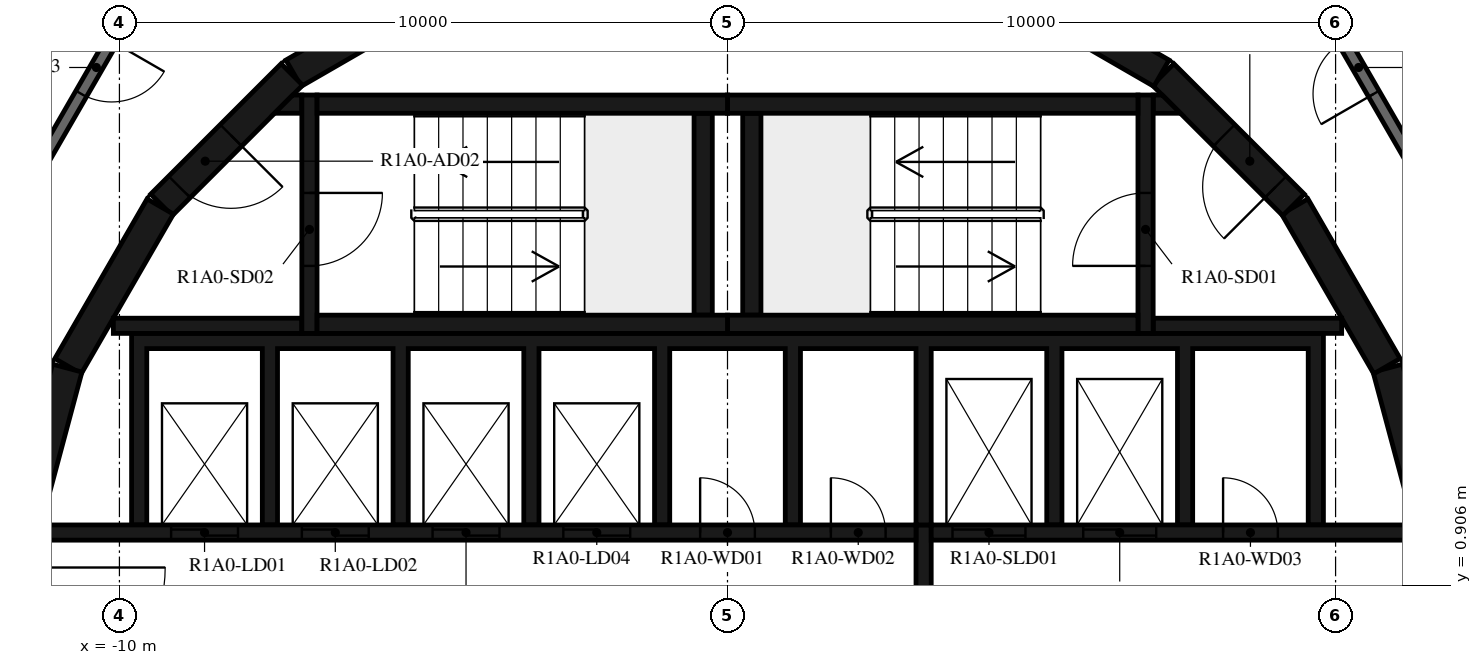
"""IFC4 building model, lengths in metres.
Left out: names, types, materials, properties, quantities, classifications, styles, units other than length and angle.
Written with IfcOpenShell. Run it as: python <this file> out.ifc"""

import sys

from ifc_helpers import new_model, si_unit, direction, frame, frame_2d, origin, place, context, subcontext, project, spatial, polyline, rectangle, outline, extrude, element, fill, save


model = new_model("IFC4")
c1 = context("Model", 3, precision=1e-05, world=origin(), true_north=direction((0.0, 1.0)))
c2 = subcontext(c1, "Body", "Model", "MODEL_VIEW")
j1 = project(units=[si_unit("LENGTHUNIT", "METRE"), si_unit("PLANEANGLEUNIT", "RADIAN")], contexts=[c1])
p1 = place(None, origin())
s1 = spatial("IfcSite", under=j1, at=p1, CompositionType="ELEMENT")
p2 = place(p1, origin())
s2 = spatial("IfcBuilding", under=s1, at=p2, CompositionType="ELEMENT")
p3 = place(p2, frame((0.0, 0.0, 38.4)))
s3 = spatial("IfcBuildingStorey", under=s2, at=p3, CompositionType="ELEMENT", Elevation=38.4)
for number, where, z_axis, x_axis in (
    (1, (11.643, 1.55, 0.0), (0.0, 0.0, 1.0), (-0.259, 0.966, 0.0)),
    (2, (10.845, 4.51, 0.0), (0.0, 0.0, 1.0), (-0.5, 0.866, 0.0)),
):
    element("IfcWall", number, at=place(p3, frame(where, z_axis=z_axis, x_axis=x_axis)), inside=s3, PredefinedType="SHEAR", context=c2, shape_type="SweptSolid", body=[
        extrude(rectangle(XDim=3.033, YDim=0.5, at=frame_2d((1.516, 0.0))), origin(), (0.0, 0.0, 1.0), 3.12),
    ])
p4 = place(p3, frame((9.308, 7.164, 0.0), z_axis=(0.0, 0.0, 1.0), x_axis=(-0.707106781187, 0.707106781187, 0.0)))
e3 = element("IfcWall", 3, at=p4, inside=s3, PredefinedType="SHEAR", context=c2, shape_type="SweptSolid", body=[
    extrude(rectangle(XDim=3.032, YDim=0.5, at=frame_2d((1.516, 0.0))), origin(), (0.0, 0.0, 1.0), 3.12),
])
p5 = place(p4, frame((0.416, 0.0, 0.0)))
e4 = element("IfcOpeningElement", 4, at=p5, cuts=e3, PredefinedType="OPENING", context=c2, shape_type="SweptSolid", body=[
    extrude(rectangle(XDim=1.2, YDim=2.1, at=frame_2d((0.6, 1.05))), frame((0.0, 0.26, 0.0), z_axis=(0.0, -1.0, 0.0), x_axis=(1.0, 0.0, 0.0)), (0.0, 0.0, 1.0), 0.52),
])
for number, where, z_axis, x_axis in (
    (5, (7.137, 9.329, 0.0), (0.0, 0.0, 1.0), (-0.866, 0.5, 0.0)),
    (6, (-4.51, 10.845, 0.0), (0.0, 0.0, 1.0), (-0.866, -0.5, 0.0)),
):
    element("IfcWall", number, at=place(p3, frame(where, z_axis=z_axis, x_axis=x_axis)), inside=s3, PredefinedType="SHEAR", context=c2, shape_type="SweptSolid", body=[
        extrude(rectangle(XDim=3.033, YDim=0.5, at=frame_2d((1.516, 0.0))), origin(), (0.0, 0.0, 1.0), 3.12),
    ])
p6 = place(p3, frame((-7.164, 9.308, 0.0), z_axis=(0.0, 0.0, 1.0), x_axis=(-0.707106781187, -0.707106781187, 0.0)))
e7 = element("IfcWall", 7, at=p6, inside=s3, PredefinedType="SHEAR", context=c2, shape_type="SweptSolid", body=[
    extrude(rectangle(XDim=3.032, YDim=0.5, at=frame_2d((1.516, 0.0))), origin(), (0.0, 0.0, 1.0), 3.12),
])
p7 = place(p6, frame((1.416, 0.0, 0.0)))
e8 = element("IfcOpeningElement", 8, at=p7, cuts=e7, PredefinedType="OPENING", context=c2, shape_type="SweptSolid", body=[
    extrude(rectangle(XDim=1.2, YDim=2.1, at=frame_2d((0.6, 1.05))), frame((0.0, 0.26, 0.0), z_axis=(0.0, -1.0, 0.0), x_axis=(1.0, 0.0, 0.0)), (0.0, 0.0, 1.0), 0.52),
])
for number, where, z_axis, x_axis in (
    (9, (-9.329, 7.137, 0.0), (0.0, 0.0, 1.0), (-0.5, -0.866, 0.0)),
    (10, (-10.858, 4.479, 0.0), (0.0, 0.0, 1.0), (-0.259, -0.966, 0.0)),
):
    element("IfcWall", number, at=place(p3, frame(where, z_axis=z_axis, x_axis=x_axis)), inside=s3, PredefinedType="SHEAR", context=c2, shape_type="SweptSolid", body=[
        extrude(rectangle(XDim=3.033, YDim=0.5, at=frame_2d((1.516, 0.0))), origin(), (0.0, 0.0, 1.0), 3.12),
    ])
for number, where, z_axis, x_axis in (
    (11, (0.0, 5.2, 0.0), (0.0, 0.0, 1.0), (1.0, 0.0, 0.0)),
    (12, (0.0, 8.82, 0.0), (0.0, 0.0, 1.0), (1.0, 0.0, 0.0)),
):
    element("IfcWall", number, at=place(p3, frame(where, z_axis=z_axis, x_axis=x_axis)), inside=s3, PredefinedType="SHEAR", context=c2, shape_type="SweptSolid", body=[
        extrude(rectangle(XDim=6.75, YDim=0.3, at=frame_2d((3.375, 0.0))), origin(), (0.0, 0.0, 1.0), 3.12),
    ])
p8 = place(p3, frame((0.4, 5.35, 0.0), z_axis=(0.0, 0.0, 1.0), x_axis=(0.0, 1.0, 0.0)))
e13 = element("IfcWall", 13, at=p8, inside=s3, PredefinedType="SHEAR", context=c2, shape_type="SweptSolid", body=[
    extrude(rectangle(XDim=3.32, YDim=0.3, at=frame_2d((1.66, 0.0))), origin(), (0.0, 0.0, 1.0), 3.12),
])
p9 = place(p3, frame((6.875, 5.05, 0.0), z_axis=(0.0, 0.0, 1.0), x_axis=(0.0, 1.0, 0.0)))
e14 = element("IfcWall", 14, at=p9, inside=s3, PredefinedType="SHEAR", context=c2, shape_type="SweptSolid", body=[
    extrude(rectangle(XDim=3.92, YDim=0.25, at=frame_2d((1.96, 0.0))), origin(), (0.0, 0.0, 1.0), 3.12),
])
p10 = place(p9, frame((1.11, 0.0, 0.0)))
e15 = element("IfcOpeningElement", 15, at=p10, cuts=e14, PredefinedType="OPENING", context=c2, shape_type="SweptSolid", body=[
    extrude(rectangle(XDim=1.2, YDim=2.1, at=frame_2d((0.6, 1.05))), frame((0.0, 0.135, 0.0), z_axis=(0.0, -1.0, 0.0), x_axis=(1.0, 0.0, 0.0)), (0.0, 0.0, 1.0), 0.27),
])
p11 = place(p3, frame((7.0, 5.175, 0.0), z_axis=(0.0, 0.0, 1.0), x_axis=(1.0, 0.0, 0.0)))
e16 = element("IfcWall", 16, at=p11, inside=s3, PredefinedType="SHEAR", context=c2, shape_type="SweptSolid", body=[
    extrude(rectangle(XDim=3.1, YDim=0.25, at=frame_2d((1.55, 0.0))), origin(), (0.0, 0.0, 1.0), 3.12),
])
p12 = place(p3, origin())
e17 = element("IfcWall", 17, at=p12, inside=s3, PredefinedType="SHEAR", context=c2, shape_type="SweptSolid", body=[
    extrude(outline(polyline([(7.448, 8.67), (7.0, 8.67), (7.0, 8.97), (7.148, 8.97), (7.448, 8.67)])), origin(), (0.0, 0.0, 1.0), 3.12),
])
for number, where, z_axis, x_axis in (
    (18, (-6.75, 5.2, 0.0), (0.0, 0.0, 1.0), (1.0, 0.0, 0.0)),
    (19, (-6.75, 8.82, 0.0), (0.0, 0.0, 1.0), (1.0, 0.0, 0.0)),
):
    element("IfcWall", number, at=place(p3, frame(where, z_axis=z_axis, x_axis=x_axis)), inside=s3, PredefinedType="SHEAR", context=c2, shape_type="SweptSolid", body=[
        extrude(rectangle(XDim=6.75, YDim=0.3, at=frame_2d((3.375, 0.0))), origin(), (0.0, 0.0, 1.0), 3.12),
    ])
p13 = place(p3, frame((-0.4, 5.35, 0.0), z_axis=(0.0, 0.0, 1.0), x_axis=(0.0, 1.0, 0.0)))
e20 = element("IfcWall", 20, at=p13, inside=s3, PredefinedType="SHEAR", context=c2, shape_type="SweptSolid", body=[
    extrude(rectangle(XDim=3.32, YDim=0.3, at=frame_2d((1.66, 0.0))), origin(), (0.0, 0.0, 1.0), 3.12),
])
p14 = place(p3, frame((-6.875, 8.97, 0.0), z_axis=(0.0, 0.0, 1.0), x_axis=(0.0, -1.0, 0.0)))
e21 = element("IfcWall", 21, at=p14, inside=s3, PredefinedType="SHEAR", context=c2, shape_type="SweptSolid", body=[
    extrude(rectangle(XDim=3.92, YDim=0.25, at=frame_2d((1.96, 0.0))), origin(), (0.0, 0.0, 1.0), 3.12),
])
p15 = place(p14, frame((1.61, 0.0, 0.0)))
e22 = element("IfcOpeningElement", 22, at=p15, cuts=e21, PredefinedType="OPENING", context=c2, shape_type="SweptSolid", body=[
    extrude(rectangle(XDim=1.2, YDim=2.1, at=frame_2d((0.6, 1.05))), frame((0.0, 0.135, 0.0), z_axis=(0.0, -1.0, 0.0), x_axis=(1.0, 0.0, 0.0)), (0.0, 0.0, 1.0), 0.27),
])
p16 = place(p3, frame((-7.0, 5.175, 0.0), z_axis=(0.0, 0.0, 1.0), x_axis=(-1.0, 0.0, 0.0)))
e23 = element("IfcWall", 23, at=p16, inside=s3, PredefinedType="SHEAR", context=c2, shape_type="SweptSolid", body=[
    extrude(rectangle(XDim=3.1, YDim=0.25, at=frame_2d((1.55, 0.0))), origin(), (0.0, 0.0, 1.0), 3.12),
])
p17 = place(p3, origin())
e24 = element("IfcWall", 24, at=p17, inside=s3, PredefinedType="SHEAR", context=c2, shape_type="SweptSolid", body=[
    extrude(outline(polyline([(-7.148, 8.97), (-7.0, 8.97), (-7.0, 8.67), (-7.448, 8.67), (-7.148, 8.97)])), origin(), (0.0, 0.0, 1.0), 3.12),
])
p18 = place(p3, origin())
e25 = element("IfcWall", 25, at=p18, inside=s3, PredefinedType="SHEAR", context=c2, shape_type="SweptSolid", body=[
    extrude(outline(polyline([(-9.55, 4.8), (-7.65, 4.8), (-7.65, 1.9), (-7.4, 1.9), (-7.4, 4.8), (-5.5, 4.8), (-5.5, 1.9), (-5.25, 1.9), (-5.25, 4.8), (-3.35, 4.8), (-3.35, 1.9), (-3.1, 1.9), (-3.1, 4.8), (-1.2, 4.8), (-1.2, 1.9), (-0.95, 1.9), (-0.95, 4.8), (0.95, 4.8), (0.95, 1.9), (1.2, 1.9), (1.2, 4.8), (3.1, 4.8), (3.1, 1.9), (3.35, 1.9), (3.35, 4.8), (5.25, 4.8), (5.25, 1.9), (5.5, 1.9), (5.5, 4.8), (7.4, 4.8), (7.4, 1.9), (7.65, 1.9), (7.65, 4.8), (9.55, 4.8), (9.55, 1.9), (9.8, 1.9), (9.8, 4.8), (9.8, 5.05), (-9.8, 5.05), (-9.8, 4.8), (-9.8, 1.9), (-9.55, 1.9), (-9.55, 4.8)])), origin(), (0.0, 0.0, 1.0), 3.12),
])
p19 = place(p3, frame((-11.28, 1.775, 0.0), z_axis=(0.0, 0.0, 1.0), x_axis=(1.0, 0.0, 0.0)))
e26 = element("IfcWall", 26, at=p19, inside=s3, PredefinedType="SHEAR", context=c2, shape_type="SweptSolid", body=[
    extrude(rectangle(XDim=14.38, YDim=0.25, at=frame_2d((7.19, 0.0))), origin(), (0.0, 0.0, 1.0), 3.12),
])
p20 = place(p19, frame((2.13, 0.0, 0.0)))
e27 = element("IfcOpeningElement", 27, at=p20, cuts=e26, PredefinedType="OPENING", context=c2, shape_type="SweptSolid", body=[
    extrude(rectangle(XDim=1.1, YDim=2.1, at=frame_2d((0.55, 1.05))), frame((0.0, 0.135, 0.0), z_axis=(0.0, -1.0, 0.0), x_axis=(1.0, 0.0, 0.0)), (0.0, 0.0, 1.0), 0.27),
])
p21 = place(p19, frame((4.28, 0.0, 0.0)))
e28 = element("IfcOpeningElement", 28, at=p21, cuts=e26, PredefinedType="OPENING", context=c2, shape_type="SweptSolid", body=[
    extrude(rectangle(XDim=1.1, YDim=2.1, at=frame_2d((0.55, 1.05))), frame((0.0, 0.135, 0.0), z_axis=(0.0, -1.0, 0.0), x_axis=(1.0, 0.0, 0.0)), (0.0, 0.0, 1.0), 0.27),
])
p22 = place(p19, frame((6.43, 0.0, 0.0)))
e29 = element("IfcOpeningElement", 29, at=p22, cuts=e26, PredefinedType="OPENING", context=c2, shape_type="SweptSolid", body=[
    extrude(rectangle(XDim=1.1, YDim=2.1, at=frame_2d((0.55, 1.05))), frame((0.0, 0.135, 0.0), z_axis=(0.0, -1.0, 0.0), x_axis=(1.0, 0.0, 0.0)), (0.0, 0.0, 1.0), 0.27),
])
p23 = place(p19, frame((8.58, 0.0, 0.0)))
e30 = element("IfcOpeningElement", 30, at=p23, cuts=e26, PredefinedType="OPENING", context=c2, shape_type="SweptSolid", body=[
    extrude(rectangle(XDim=1.1, YDim=2.1, at=frame_2d((0.55, 1.05))), frame((0.0, 0.135, 0.0), z_axis=(0.0, -1.0, 0.0), x_axis=(1.0, 0.0, 0.0)), (0.0, 0.0, 1.0), 0.27),
])
p24 = place(p19, frame((10.83, 0.0, 0.0)))
e31 = element("IfcOpeningElement", 31, at=p24, cuts=e26, PredefinedType="OPENING", context=c2, shape_type="SweptSolid", body=[
    extrude(rectangle(XDim=0.9, YDim=2.1, at=frame_2d((0.45, 1.05))), frame((0.0, 0.135, 0.0), z_axis=(0.0, -1.0, 0.0), x_axis=(1.0, 0.0, 0.0)), (0.0, 0.0, 1.0), 0.27),
])
p25 = place(p19, frame((12.98, 0.0, 0.0)))
e32 = element("IfcOpeningElement", 32, at=p25, cuts=e26, PredefinedType="OPENING", context=c2, shape_type="SweptSolid", body=[
    extrude(rectangle(XDim=0.9, YDim=2.1, at=frame_2d((0.45, 1.05))), frame((0.0, 0.135, 0.0), z_axis=(0.0, -1.0, 0.0), x_axis=(1.0, 0.0, 0.0)), (0.0, 0.0, 1.0), 0.27),
])
p26 = place(p3, frame((3.35, 1.775, 0.0), z_axis=(0.0, 0.0, 1.0), x_axis=(1.0, 0.0, 0.0)))
e33 = element("IfcWall", 33, at=p26, inside=s3, PredefinedType="SHEAR", context=c2, shape_type="SweptSolid", body=[
    extrude(rectangle(XDim=7.93, YDim=0.25, at=frame_2d((3.965, 0.0))), origin(), (0.0, 0.0, 1.0), 3.12),
])
p27 = place(p26, frame((0.35, 0.0, 0.0)))
e34 = element("IfcOpeningElement", 34, at=p27, cuts=e33, PredefinedType="OPENING", context=c2, shape_type="SweptSolid", body=[
    extrude(rectangle(XDim=1.2, YDim=2.4, at=frame_2d((0.6, 1.2))), frame((0.0, 0.135, 0.0), z_axis=(0.0, -1.0, 0.0), x_axis=(1.0, 0.0, 0.0)), (0.0, 0.0, 1.0), 0.27),
])
p28 = place(p26, frame((2.5, 0.0, 0.0)))
e35 = element("IfcOpeningElement", 35, at=p28, cuts=e33, PredefinedType="OPENING", context=c2, shape_type="SweptSolid", body=[
    extrude(rectangle(XDim=1.2, YDim=2.4, at=frame_2d((0.6, 1.2))), frame((0.0, 0.135, 0.0), z_axis=(0.0, -1.0, 0.0), x_axis=(1.0, 0.0, 0.0)), (0.0, 0.0, 1.0), 0.27),
])
p29 = place(p26, frame((4.8, 0.0, 0.0)))
e36 = element("IfcOpeningElement", 36, at=p29, cuts=e33, PredefinedType="OPENING", context=c2, shape_type="SweptSolid", body=[
    extrude(rectangle(XDim=0.9, YDim=2.1, at=frame_2d((0.45, 1.05))), frame((0.0, 0.135, 0.0), z_axis=(0.0, -1.0, 0.0), x_axis=(1.0, 0.0, 0.0)), (0.0, 0.0, 1.0), 0.27),
])
p30 = place(p3, frame((3.225, -1.9, 0.0), z_axis=(0.0, 0.0, 1.0), x_axis=(0.0, 1.0, 0.0)))
e37 = element("IfcWall", 37, at=p30, inside=s3, PredefinedType="SHEAR", context=c2, shape_type="SweptSolid", body=[
    extrude(rectangle(XDim=3.8, YDim=0.25, at=frame_2d((1.9, 0.0))), origin(), (0.0, 0.0, 1.0), 3.12),
])
p31 = place(p3, frame((13.7, 3.671, 0.0), z_axis=(0.0, 0.0, 1.0), x_axis=(-0.500001669485, 0.866024439905, 0.0)))
e38 = element("IfcWall", 38, at=p31, inside=s3, PredefinedType="STANDARD", context=c2, shape_type="SweptSolid", body=[
    extrude(rectangle(XDim=7.342, YDim=0.2, at=frame_2d((3.671, 0.0))), origin(), (0.0, 0.0, 1.0), 3.12),
])
p32 = place(p31, frame((6.142, 0.0, 0.0)))
e39 = element("IfcOpeningElement", 39, at=p32, cuts=e38, PredefinedType="OPENING", context=c2, shape_type="SweptSolid", body=[
    extrude(rectangle(XDim=1.0, YDim=2.1, at=frame_2d((0.5, 1.05))), frame((0.0, 0.11, 0.0), z_axis=(0.0, -1.0, 0.0), x_axis=(1.0, 0.0, 0.0)), (0.0, 0.0, 1.0), 0.22),
])
p33 = place(p3, frame((-10.029, 10.029, 0.0), z_axis=(0.0, 0.0, 1.0), x_axis=(-0.500001669485, -0.866024439905, 0.0)))
e40 = element("IfcWall", 40, at=p33, inside=s3, PredefinedType="STANDARD", context=c2, shape_type="SweptSolid", body=[
    extrude(rectangle(XDim=7.342, YDim=0.2, at=frame_2d((3.671, 0.0))), origin(), (0.0, 0.0, 1.0), 3.12),
])
p34 = place(p33, frame((0.2, 0.0, 0.0)))
e41 = element("IfcOpeningElement", 41, at=p34, cuts=e40, PredefinedType="OPENING", context=c2, shape_type="SweptSolid", body=[
    extrude(rectangle(XDim=1.0, YDim=2.1, at=frame_2d((0.5, 1.05))), frame((0.0, 0.11, 0.0), z_axis=(0.0, -1.0, 0.0), x_axis=(1.0, 0.0, 0.0)), (0.0, 0.0, 1.0), 0.22),
])
p35 = place(p3, frame((12.781, 8.262, 0.0), z_axis=(0.0, 0.0, 1.0), x_axis=(-0.492233259633, 0.870463335305, 0.0)))
e42 = element("IfcWall", 42, at=p35, inside=s3, PredefinedType="PARTITIONING", context=c2, shape_type="SweptSolid", body=[
    extrude(rectangle(XDim=3.336, YDim=0.12, at=frame_2d((1.668, 0.0))), origin(), (0.0, 0.0, 1.0), 3.12),
])
p36 = place(p10, origin())
e43 = element("IfcDoor", 43, at=p36, inside=s3, OperationType="SINGLE_SWING_LEFT", PredefinedType="DOOR", context=c2, shape_type="SweptSolid", body=[
    extrude(rectangle(XDim=1.2, YDim=2.1, at=frame_2d((0.6, 1.05))), frame((0.0, 0.025, 0.0), z_axis=(0.0, -1.0, 0.0), x_axis=(1.0, 0.0, 0.0)), (0.0, 0.0, 1.0), 0.05),
])
fill(e15, e43)
p37 = place(p5, origin())
e44 = element("IfcDoor", 44, at=p37, inside=s3, OperationType="SINGLE_SWING_RIGHT", PredefinedType="DOOR", context=c2, shape_type="SweptSolid", body=[
    extrude(rectangle(XDim=1.2, YDim=2.1, at=frame_2d((0.6, 1.05))), frame((0.0, 0.025, 0.0), z_axis=(0.0, -1.0, 0.0), x_axis=(1.0, 0.0, 0.0)), (0.0, 0.0, 1.0), 0.05),
])
fill(e4, e44)
p38 = place(p15, origin())
e45 = element("IfcDoor", 45, at=p38, inside=s3, OperationType="SINGLE_SWING_LEFT", PredefinedType="DOOR", context=c2, shape_type="SweptSolid", body=[
    extrude(rectangle(XDim=1.2, YDim=2.1, at=frame_2d((0.6, 1.05))), frame((0.0, 0.025, 0.0), z_axis=(0.0, -1.0, 0.0), x_axis=(1.0, 0.0, 0.0)), (0.0, 0.0, 1.0), 0.05),
])
fill(e22, e45)
p39 = place(p7, origin())
e46 = element("IfcDoor", 46, at=p39, inside=s3, OperationType="SINGLE_SWING_RIGHT", PredefinedType="DOOR", context=c2, shape_type="SweptSolid", body=[
    extrude(rectangle(XDim=1.2, YDim=2.1, at=frame_2d((0.6, 1.05))), frame((0.0, 0.025, 0.0), z_axis=(0.0, -1.0, 0.0), x_axis=(1.0, 0.0, 0.0)), (0.0, 0.0, 1.0), 0.05),
])
fill(e8, e46)
p40 = place(p20, origin())
e47 = element("IfcDoor", 47, at=p40, inside=s3, OperationType="DOUBLE_DOOR_SLIDING", PredefinedType="DOOR", context=c2, shape_type="SweptSolid", body=[
    extrude(rectangle(XDim=1.1, YDim=2.1, at=frame_2d((0.55, 1.05))), frame((0.0, 0.025, 0.0), z_axis=(0.0, -1.0, 0.0), x_axis=(1.0, 0.0, 0.0)), (0.0, 0.0, 1.0), 0.05),
])
fill(e27, e47)
p41 = place(p21, origin())
e48 = element("IfcDoor", 48, at=p41, inside=s3, OperationType="DOUBLE_DOOR_SLIDING", PredefinedType="DOOR", context=c2, shape_type="SweptSolid", body=[
    extrude(rectangle(XDim=1.1, YDim=2.1, at=frame_2d((0.55, 1.05))), frame((0.0, 0.025, 0.0), z_axis=(0.0, -1.0, 0.0), x_axis=(1.0, 0.0, 0.0)), (0.0, 0.0, 1.0), 0.05),
])
fill(e28, e48)
p42 = place(p22, origin())
e49 = element("IfcDoor", 49, at=p42, inside=s3, OperationType="DOUBLE_DOOR_SLIDING", PredefinedType="DOOR", context=c2, shape_type="SweptSolid", body=[
    extrude(rectangle(XDim=1.1, YDim=2.1, at=frame_2d((0.55, 1.05))), frame((0.0, 0.025, 0.0), z_axis=(0.0, -1.0, 0.0), x_axis=(1.0, 0.0, 0.0)), (0.0, 0.0, 1.0), 0.05),
])
fill(e29, e49)
p43 = place(p23, origin())
e50 = element("IfcDoor", 50, at=p43, inside=s3, OperationType="DOUBLE_DOOR_SLIDING", PredefinedType="DOOR", context=c2, shape_type="SweptSolid", body=[
    extrude(rectangle(XDim=1.1, YDim=2.1, at=frame_2d((0.55, 1.05))), frame((0.0, 0.025, 0.0), z_axis=(0.0, -1.0, 0.0), x_axis=(1.0, 0.0, 0.0)), (0.0, 0.0, 1.0), 0.05),
])
fill(e30, e50)
p44 = place(p27, origin())
e51 = element("IfcDoor", 51, at=p44, inside=s3, OperationType="DOUBLE_DOOR_SLIDING", PredefinedType="DOOR", context=c2, shape_type="SweptSolid", body=[
    extrude(rectangle(XDim=1.2, YDim=2.4, at=frame_2d((0.6, 1.2))), frame((0.0, 0.025, 0.0), z_axis=(0.0, -1.0, 0.0), x_axis=(1.0, 0.0, 0.0)), (0.0, 0.0, 1.0), 0.05),
])
fill(e34, e51)
p45 = place(p28, origin())
e52 = element("IfcDoor", 52, at=p45, inside=s3, OperationType="DOUBLE_DOOR_SLIDING", PredefinedType="DOOR", context=c2, shape_type="SweptSolid", body=[
    extrude(rectangle(XDim=1.2, YDim=2.4, at=frame_2d((0.6, 1.2))), frame((0.0, 0.025, 0.0), z_axis=(0.0, -1.0, 0.0), x_axis=(1.0, 0.0, 0.0)), (0.0, 0.0, 1.0), 0.05),
])
fill(e35, e52)
p46 = place(p24, origin())
e53 = element("IfcDoor", 53, at=p46, inside=s3, OperationType="SINGLE_SWING_RIGHT", PredefinedType="DOOR", context=c2, shape_type="SweptSolid", body=[
    extrude(rectangle(XDim=0.9, YDim=2.1, at=frame_2d((0.45, 1.05))), frame((0.0, 0.025, 0.0), z_axis=(0.0, -1.0, 0.0), x_axis=(1.0, 0.0, 0.0)), (0.0, 0.0, 1.0), 0.05),
])
fill(e31, e53)
p47 = place(p25, origin())
e54 = element("IfcDoor", 54, at=p47, inside=s3, OperationType="SINGLE_SWING_LEFT", PredefinedType="DOOR", context=c2, shape_type="SweptSolid", body=[
    extrude(rectangle(XDim=0.9, YDim=2.1, at=frame_2d((0.45, 1.05))), frame((0.0, 0.025, 0.0), z_axis=(0.0, -1.0, 0.0), x_axis=(1.0, 0.0, 0.0)), (0.0, 0.0, 1.0), 0.05),
])
fill(e32, e54)
p48 = place(p29, origin())
e55 = element("IfcDoor", 55, at=p48, inside=s3, OperationType="SINGLE_SWING_RIGHT", PredefinedType="DOOR", context=c2, shape_type="SweptSolid", body=[
    extrude(rectangle(XDim=0.9, YDim=2.1, at=frame_2d((0.45, 1.05))), frame((0.0, 0.025, 0.0), z_axis=(0.0, -1.0, 0.0), x_axis=(1.0, 0.0, 0.0)), (0.0, 0.0, 1.0), 0.05),
])
fill(e36, e55)
p49 = place(p32, origin())
e56 = element("IfcDoor", 56, at=p49, inside=s3, OperationType="SINGLE_SWING_RIGHT", PredefinedType="DOOR", context=c2, shape_type="SweptSolid", body=[
    extrude(rectangle(XDim=1.0, YDim=2.1, at=frame_2d((0.5, 1.05))), frame((0.0, 0.025, 0.0), z_axis=(0.0, -1.0, 0.0), x_axis=(1.0, 0.0, 0.0)), (0.0, 0.0, 1.0), 0.05),
])
fill(e39, e56)
p50 = place(p34, origin())
e57 = element("IfcDoor", 57, at=p50, inside=s3, OperationType="SINGLE_SWING_LEFT", PredefinedType="DOOR", context=c2, shape_type="SweptSolid", body=[
    extrude(rectangle(XDim=1.0, YDim=2.1, at=frame_2d((0.5, 1.05))), frame((0.0, 0.025, 0.0), z_axis=(0.0, -1.0, 0.0), x_axis=(1.0, 0.0, 0.0)), (0.0, 0.0, 1.0), 0.05),
])
fill(e41, e57)
save(model, sys.argv[1])
